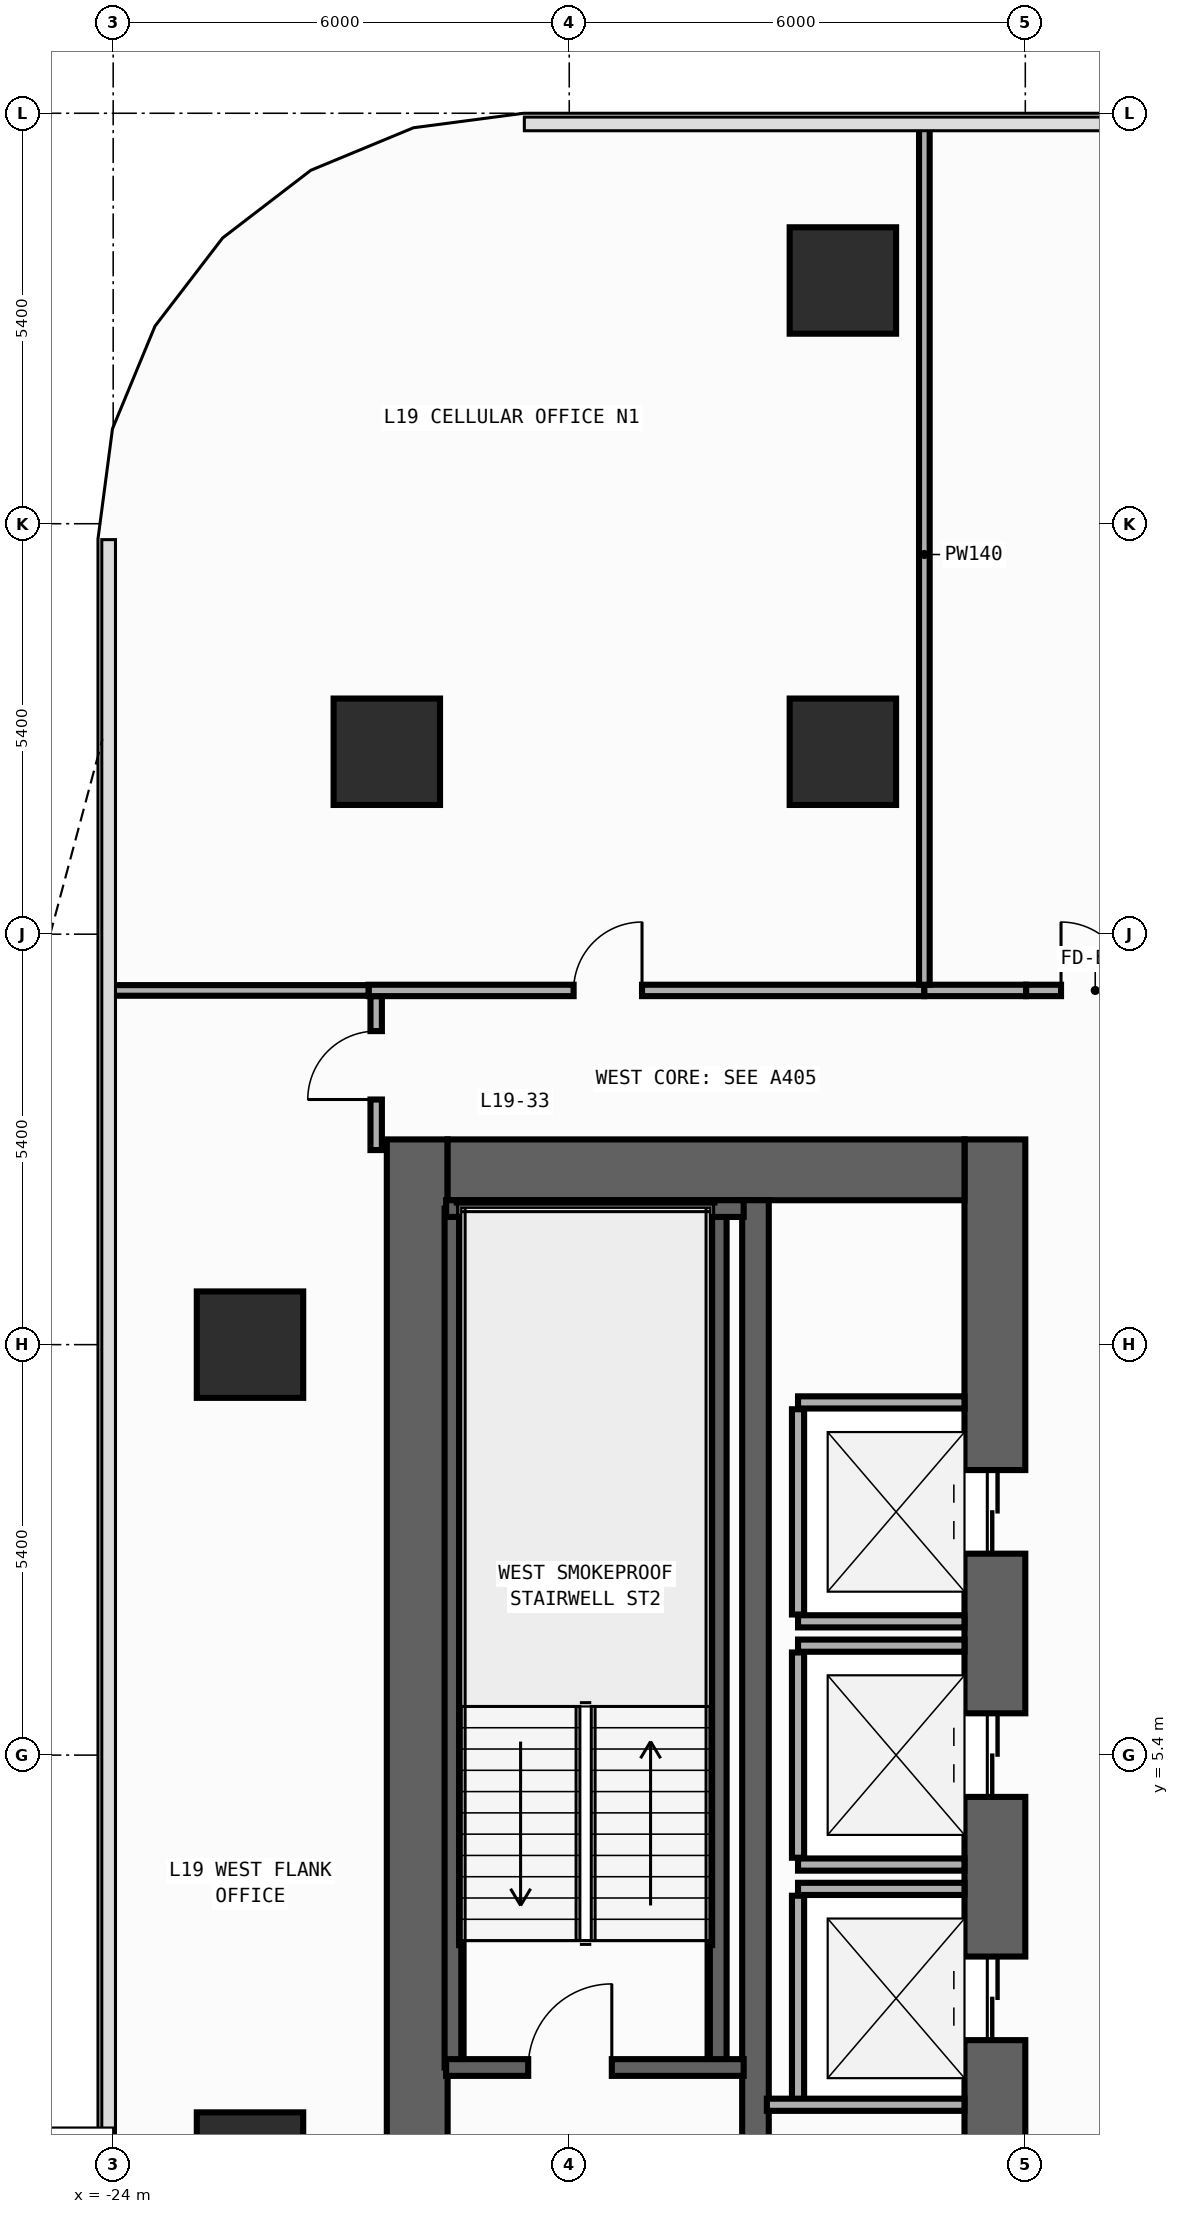
"""IFC4 building model, lengths in metres.
Left out: names, types, materials, properties, quantities, classifications, styles, units other than length and angle.
Written with IfcOpenShell. Run it as: python <this file> out.ifc"""

import sys

from ifc_helpers import new_model, si_unit, direction, frame, frame_2d, origin, origin_2d, place, context, subcontext, project, spatial, rectangle, extrude, element, fill, save


model = new_model("IFC4")
c1 = context("Model", 3, precision=1e-05, world=origin(), true_north=direction((0.0, 1.0)))
c2 = subcontext(c1, "Body", "Model", "MODEL_VIEW")
j1 = project(units=[si_unit("LENGTHUNIT", "METRE"), si_unit("PLANEANGLEUNIT", "RADIAN")], contexts=[c1])
p1 = place(None, origin())
s1 = spatial("IfcSite", under=j1, at=p1, CompositionType="ELEMENT")
p2 = place(p1, origin())
s2 = spatial("IfcBuilding", under=s1, at=p2, CompositionType="ELEMENT")
p3 = place(p2, frame((0.0, 0.0, 80.6)))
s3 = spatial("IfcBuildingStorey", under=s2, at=p3, CompositionType="ELEMENT", Elevation=80.6)
p4 = place(p3, frame((-20.0, -13.5, 0.0), z_axis=(0.0, 0.0, 1.0), x_axis=(0.0, 1.0, 0.0)))
e1 = element("IfcWall", 1, at=p4, inside=s3, PredefinedType="SHEAR", context=c2, shape_type="SweptSolid", body=[
    extrude(rectangle(XDim=27.0, YDim=0.8, at=frame_2d((13.5, 0.0))), origin(), (0.0, 0.0, 1.0), 3.85),
])
p5 = place(p3, frame((-12.4, -13.5, 0.0), z_axis=(0.0, 0.0, 1.0), x_axis=(0.0, 1.0, 0.0)))
e2 = element("IfcWall", 2, at=p5, inside=s3, PredefinedType="SHEAR", context=c2, shape_type="SweptSolid", body=[
    extrude(rectangle(XDim=27.0, YDim=0.8, at=frame_2d((13.5, 0.0))), origin(), (0.0, 0.0, 1.0), 3.85),
])
p6 = place(p5, frame((21.55, 0.0, 0.0)))
e3 = element("IfcOpeningElement", 3, at=p6, cuts=e2, PredefinedType="OPENING", context=c2, shape_type="SweptSolid", body=[
    extrude(rectangle(XDim=1.1, YDim=2.2, at=frame_2d((0.55, 1.1))), frame((0.0, 0.41, 0.0), z_axis=(0.0, -1.0, 0.0), x_axis=(1.0, 0.0, 0.0)), (0.0, 0.0, 1.0), 0.82),
])
p7 = place(p5, frame((18.35, 0.0, 0.0)))
e4 = element("IfcOpeningElement", 4, at=p7, cuts=e2, PredefinedType="OPENING", context=c2, shape_type="SweptSolid", body=[
    extrude(rectangle(XDim=1.1, YDim=2.2, at=frame_2d((0.55, 1.1))), frame((0.0, 0.41, 0.0), z_axis=(0.0, -1.0, 0.0), x_axis=(1.0, 0.0, 0.0)), (0.0, 0.0, 1.0), 0.82),
])
p8 = place(p5, frame((15.15, 0.0, 0.0)))
e5 = element("IfcOpeningElement", 5, at=p8, cuts=e2, PredefinedType="OPENING", context=c2, shape_type="SweptSolid", body=[
    extrude(rectangle(XDim=1.1, YDim=2.2, at=frame_2d((0.55, 1.1))), frame((0.0, 0.41, 0.0), z_axis=(0.0, -1.0, 0.0), x_axis=(1.0, 0.0, 0.0)), (0.0, 0.0, 1.0), 0.82),
])
p9 = place(p5, frame((10.35, 0.0, 0.0)))
e6 = element("IfcOpeningElement", 6, at=p9, cuts=e2, PredefinedType="OPENING", context=c2, shape_type="SweptSolid", body=[
    extrude(rectangle(XDim=1.1, YDim=2.2, at=frame_2d((0.55, 1.1))), frame((0.0, 0.41, 0.0), z_axis=(0.0, -1.0, 0.0), x_axis=(1.0, 0.0, 0.0)), (0.0, 0.0, 1.0), 0.82),
])
p10 = place(p5, frame((7.15, 0.0, 0.0)))
e7 = element("IfcOpeningElement", 7, at=p10, cuts=e2, PredefinedType="OPENING", context=c2, shape_type="SweptSolid", body=[
    extrude(rectangle(XDim=1.1, YDim=2.2, at=frame_2d((0.55, 1.1))), frame((0.0, 0.41, 0.0), z_axis=(0.0, -1.0, 0.0), x_axis=(1.0, 0.0, 0.0)), (0.0, 0.0, 1.0), 0.82),
])
p11 = place(p5, frame((3.95, 0.0, 0.0)))
e8 = element("IfcOpeningElement", 8, at=p11, cuts=e2, PredefinedType="OPENING", context=c2, shape_type="SweptSolid", body=[
    extrude(rectangle(XDim=1.1, YDim=2.2, at=frame_2d((0.55, 1.1))), frame((0.0, 0.41, 0.0), z_axis=(0.0, -1.0, 0.0), x_axis=(1.0, 0.0, 0.0)), (0.0, 0.0, 1.0), 0.82),
])
p12 = place(p5, frame((12.725, 0.0, 0.0)))
e9 = element("IfcOpeningElement", 9, at=p12, cuts=e2, PredefinedType="OPENING", context=c2, shape_type="SweptSolid", body=[
    extrude(rectangle(XDim=1.15, YDim=2.2, at=frame_2d((0.575, 1.1))), frame((0.0, 0.41, 0.0), z_axis=(0.0, -1.0, 0.0), x_axis=(1.0, 0.0, 0.0)), (0.0, 0.0, 1.0), 0.82),
])
p13 = place(p5, frame((1.625, 0.0, 0.0)))
e10 = element("IfcOpeningElement", 10, at=p13, cuts=e2, PredefinedType="OPENING", context=c2, shape_type="SweptSolid", body=[
    extrude(rectangle(XDim=0.85, YDim=2.1, at=frame_2d((0.425, 1.05))), frame((0.0, 0.41, 0.0), z_axis=(0.0, -1.0, 0.0), x_axis=(1.0, 0.0, 0.0)), (0.0, 0.0, 1.0), 0.82),
])
p14 = place(p3, frame((-19.6, 13.1, 0.0), z_axis=(0.0, 0.0, 1.0), x_axis=(1.0, 0.0, 0.0)))
e11 = element("IfcWall", 11, at=p14, inside=s3, PredefinedType="SHEAR", context=c2, shape_type="SweptSolid", body=[
    extrude(rectangle(XDim=6.8, YDim=0.8, at=frame_2d((3.4, 0.0))), origin(), (0.0, 0.0, 1.0), 3.85),
])
p15 = place(p3, frame((-15.55, -12.7, 0.0), z_axis=(0.0, 0.0, 1.0), x_axis=(0.0, 1.0, 0.0)))
e12 = element("IfcWall", 12, at=p15, inside=s3, PredefinedType="SHEAR", context=c2, shape_type="SweptSolid", body=[
    extrude(rectangle(XDim=25.4, YDim=0.35, at=frame_2d((12.7, 0.0))), origin(), (0.0, 0.0, 1.0), 3.85),
])
p16 = place(p15, frame((11.925, 0.0, 0.0)))
e13 = element("IfcOpeningElement", 13, at=p16, cuts=e12, PredefinedType="OPENING", context=c2, shape_type="SweptSolid", body=[
    extrude(rectangle(XDim=1.15, YDim=2.2, at=frame_2d((0.575, 1.1))), frame((0.0, 0.185, 0.0), z_axis=(0.0, -1.0, 0.0), x_axis=(1.0, 0.0, 0.0)), (0.0, 0.0, 1.0), 0.37),
])
p17 = place(p15, frame((0.825, 0.0, 0.0)))
e14 = element("IfcOpeningElement", 14, at=p17, cuts=e12, PredefinedType="OPENING", context=c2, shape_type="SweptSolid", body=[
    extrude(rectangle(XDim=0.85, YDim=2.1, at=frame_2d((0.425, 1.05))), frame((0.0, 0.185, 0.0), z_axis=(0.0, -1.0, 0.0), x_axis=(1.0, 0.0, 0.0)), (0.0, 0.0, 1.0), 0.37),
])
for number, where, z_axis, x_axis in (
    (15, (-16.04, 1.29, 0.0), (0.0, 0.0, 1.0), (0.0, 1.0, 0.0)),
    (16, (-19.53, 1.29, 0.0), (0.0, 0.0, 1.0), (0.0, 1.0, 0.0)),
):
    element("IfcWall", number, at=place(p3, frame(where, z_axis=z_axis, x_axis=x_axis)), inside=s3, PredefinedType="SHEAR", context=c2, shape_type="SweptSolid", body=[
        extrude(rectangle(XDim=11.3, YDim=0.22, at=frame_2d((5.65, 0.0))), origin(), (0.0, 0.0, 1.0), 3.85),
    ])
p18 = place(p3, frame((-19.62, 12.59, 0.0), z_axis=(0.0, 0.0, 1.0), x_axis=(1.0, 0.0, 0.0)))
e17 = element("IfcWall", 17, at=p18, inside=s3, PredefinedType="SHEAR", context=c2, shape_type="SweptSolid", body=[
    extrude(rectangle(XDim=3.915, YDim=0.22, at=frame_2d((1.958, 0.0))), origin(), (0.0, 0.0, 1.0), 3.85),
])
p19 = place(p3, frame((-19.62, 1.29, 0.0), z_axis=(0.0, 0.0, 1.0), x_axis=(1.0, 0.0, 0.0)))
e18 = element("IfcWall", 18, at=p19, inside=s3, PredefinedType="SHEAR", context=c2, shape_type="SweptSolid", body=[
    extrude(rectangle(XDim=3.915, YDim=0.22, at=frame_2d((1.958, 0.0))), origin(), (0.0, 0.0, 1.0), 3.85),
])
p20 = place(p19, frame((1.08, 0.0, 0.0)))
e19 = element("IfcOpeningElement", 19, at=p20, cuts=e18, PredefinedType="OPENING", context=c2, shape_type="SweptSolid", body=[
    extrude(rectangle(XDim=1.1, YDim=2.2, at=frame_2d((0.55, 1.1))), frame((0.0, 0.12, 0.0), z_axis=(0.0, -1.0, 0.0), x_axis=(1.0, 0.0, 0.0)), (0.0, 0.0, 1.0), 0.24),
])
for number, where, z_axis, x_axis in (
    (20, (-20.4, 18.6, 0.0), (0.0, 0.0, 1.0), (1.0, 0.0, 0.0)),
    (21, (-14.4, 18.6, 0.0), (0.0, 0.0, 1.0), (1.0, 0.0, 0.0)),
    (22, (-22.2, 0.0, 0.0), (0.0, 0.0, 1.0), (1.0, 0.0, 0.0)),
    (23, (-22.2, 10.8, 0.0), (0.0, 0.0, 1.0), (1.0, 0.0, 0.0)),
    (24, (-14.4, 24.8, 0.0), (0.0, 0.0, 1.0), (1.0, 0.0, 0.0)),
):
    element("IfcColumn", number, at=place(p3, frame(where, z_axis=z_axis, x_axis=x_axis)), inside=s3, PredefinedType="COLUMN", context=c2, shape_type="SweptSolid", body=[
        extrude(rectangle(XDim=1.4, YDim=1.4, at=origin_2d()), origin(), (0.0, 0.0, 1.0), 4.2),
    ])
for number, where, z_axis, x_axis in (
    (25, (-14.99, 7.16, 0.0), (0.0, 0.0, 1.0), (1.0, 0.0, 0.0)),
    (26, (-14.99, 10.04, 0.0), (0.0, 0.0, 1.0), (1.0, 0.0, 0.0)),
):
    element("IfcWall", number, at=place(p3, frame(where, z_axis=z_axis, x_axis=x_axis)), inside=s3, PredefinedType="STANDARD", context=c2, shape_type="SweptSolid", body=[
        extrude(rectangle(XDim=2.19, YDim=0.16, at=frame_2d((1.095, 0.0))), origin(), (0.0, 0.0, 1.0), 3.85),
    ])
p21 = place(p3, frame((-14.99, 7.25, 0.0), z_axis=(0.0, 0.0, 1.0), x_axis=(0.0, 1.0, 0.0)))
e27 = element("IfcWall", 27, at=p21, inside=s3, PredefinedType="STANDARD", context=c2, shape_type="SweptSolid", body=[
    extrude(rectangle(XDim=2.7, YDim=0.16, at=frame_2d((1.35, 0.0))), origin(), (0.0, 0.0, 1.0), 3.85),
])
for number, where, z_axis, x_axis in (
    (28, (-14.99, 3.96, 0.0), (0.0, 0.0, 1.0), (1.0, 0.0, 0.0)),
    (29, (-14.99, 6.84, 0.0), (0.0, 0.0, 1.0), (1.0, 0.0, 0.0)),
):
    element("IfcWall", number, at=place(p3, frame(where, z_axis=z_axis, x_axis=x_axis)), inside=s3, PredefinedType="STANDARD", context=c2, shape_type="SweptSolid", body=[
        extrude(rectangle(XDim=2.19, YDim=0.16, at=frame_2d((1.095, 0.0))), origin(), (0.0, 0.0, 1.0), 3.85),
    ])
p22 = place(p3, frame((-14.99, 4.05, 0.0), z_axis=(0.0, 0.0, 1.0), x_axis=(0.0, 1.0, 0.0)))
e30 = element("IfcWall", 30, at=p22, inside=s3, PredefinedType="STANDARD", context=c2, shape_type="SweptSolid", body=[
    extrude(rectangle(XDim=2.7, YDim=0.16, at=frame_2d((1.35, 0.0))), origin(), (0.0, 0.0, 1.0), 3.85),
])
p23 = place(p3, frame((-14.99, 3.64, 0.0), z_axis=(0.0, 0.0, 1.0), x_axis=(1.0, 0.0, 0.0)))
e31 = element("IfcWall", 31, at=p23, inside=s3, PredefinedType="STANDARD", context=c2, shape_type="SweptSolid", body=[
    extrude(rectangle(XDim=2.19, YDim=0.16, at=frame_2d((1.095, 0.0))), origin(), (0.0, 0.0, 1.0), 3.85),
])
p24 = place(p3, frame((-14.99, 0.85, 0.0), z_axis=(0.0, 0.0, 1.0), x_axis=(0.0, 1.0, 0.0)))
e32 = element("IfcWall", 32, at=p24, inside=s3, PredefinedType="STANDARD", context=c2, shape_type="SweptSolid", body=[
    extrude(rectangle(XDim=2.7, YDim=0.16, at=frame_2d((1.35, 0.0))), origin(), (0.0, 0.0, 1.0), 3.85),
])
p25 = place(p3, frame((-15.4, 0.8, 0.0), z_axis=(0.0, 0.0, 1.0), x_axis=(1.0, 0.0, 0.0)))
e33 = element("IfcWall", 33, at=p25, inside=s3, PredefinedType="STANDARD", context=c2, shape_type="SweptSolid", body=[
    extrude(rectangle(XDim=2.6, YDim=0.16, at=frame_2d((1.3, 0.0))), origin(), (0.0, 0.0, 1.0), 3.85),
])
p26 = place(p3, frame((-11.99, 15.46, 0.0), z_axis=(0.0, 0.0, 1.0), x_axis=(1.0, 0.0, 0.0)))
e34 = element("IfcWall", 34, at=p26, inside=s3, PredefinedType="PARTITIONING", context=c2, shape_type="SweptSolid", body=[
    extrude(rectangle(XDim=1.98, YDim=0.15, at=frame_2d((0.99, 0.0))), origin(), (0.0, 0.0, 1.0), 3.85),
])
p27 = place(p26, frame((0.46, 0.0, 0.0)))
e35 = element("IfcOpeningElement", 35, at=p27, cuts=e34, PredefinedType="OPENING", context=c2, shape_type="SweptSolid", body=[
    extrude(rectangle(XDim=0.9, YDim=2.15, at=frame_2d((0.45, 1.075))), frame((0.0, 0.085, 0.0), z_axis=(0.0, -1.0, 0.0), x_axis=(1.0, 0.0, 0.0)), (0.0, 0.0, 1.0), 0.17),
])
p28 = place(p3, frame((-20.54, 13.36, 0.0), z_axis=(0.0, 0.0, 1.0), x_axis=(0.0, 1.0, 0.0)))
e36 = element("IfcWall", 36, at=p28, inside=s3, PredefinedType="PARTITIONING", context=c2, shape_type="SweptSolid", body=[
    extrude(rectangle(XDim=2.025, YDim=0.15, at=frame_2d((1.012, 0.0))), origin(), (0.0, 0.0, 1.0), 3.85),
])
p29 = place(p28, frame((0.665, 0.0, 0.0)))
e37 = element("IfcOpeningElement", 37, at=p29, cuts=e36, PredefinedType="OPENING", context=c2, shape_type="SweptSolid", body=[
    extrude(rectangle(XDim=0.9, YDim=2.15, at=frame_2d((0.45, 1.075))), frame((0.0, 0.085, 0.0), z_axis=(0.0, -1.0, 0.0), x_axis=(1.0, 0.0, 0.0)), (0.0, 0.0, 1.0), 0.17),
])
p30 = place(p3, frame((-20.64, 15.46, 0.0), z_axis=(0.0, 0.0, 1.0), x_axis=(1.0, 0.0, 0.0)))
e38 = element("IfcWall", 38, at=p30, inside=s3, PredefinedType="PARTITIONING", context=c2, shape_type="SweptSolid", body=[
    extrude(rectangle(XDim=7.312, YDim=0.15, at=frame_2d((3.656, 0.0))), origin(), (0.0, 0.0, 1.0), 3.85),
])
p31 = place(p30, frame((2.698, 0.0, 0.0)))
e39 = element("IfcOpeningElement", 39, at=p31, cuts=e38, PredefinedType="OPENING", context=c2, shape_type="SweptSolid", body=[
    extrude(rectangle(XDim=0.9, YDim=2.15, at=frame_2d((0.45, 1.075))), frame((0.0, 0.085, 0.0), z_axis=(0.0, -1.0, 0.0), x_axis=(1.0, 0.0, 0.0)), (0.0, 0.0, 1.0), 0.17),
])
p32 = place(p3, frame((-13.328, 15.46, 0.0), z_axis=(0.0, 0.0, 1.0), x_axis=(1.0, 0.0, 0.0)))
e40 = element("IfcWall", 40, at=p32, inside=s3, PredefinedType="PARTITIONING", context=c2, shape_type="SweptSolid", body=[
    extrude(rectangle(XDim=1.338, YDim=0.15, at=frame_2d((0.669, 0.0))), origin(), (0.0, 0.0, 1.0), 3.85),
])
p33 = place(p3, frame((-24.055, 15.46, 0.0), z_axis=(0.0, 0.0, 1.0), x_axis=(1.0, 0.0, 0.0)))
e41 = element("IfcWall", 41, at=p33, inside=s3, PredefinedType="PARTITIONING", context=c2, shape_type="SweptSolid", body=[
    extrude(rectangle(XDim=3.415, YDim=0.14, at=frame_2d((1.708, 0.0))), origin(), (0.0, 0.0, 1.0), 3.85),
])
p34 = place(p3, frame((-13.328, 15.535, 0.0), z_axis=(0.0, 0.0, 1.0), x_axis=(0.0, 1.0, 0.0)))
e42 = element("IfcWall", 42, at=p34, inside=s3, PredefinedType="PARTITIONING", context=c2, shape_type="SweptSolid", body=[
    extrude(rectangle(XDim=11.32, YDim=0.14, at=frame_2d((5.66, 0.0))), origin(), (0.0, 0.0, 1.0), 3.85),
])
p35 = place(p20, origin())
e43 = element("IfcDoor", 43, at=p35, inside=s3, OperationType="SINGLE_SWING_RIGHT", PredefinedType="DOOR", context=c2, shape_type="SweptSolid", body=[
    extrude(rectangle(XDim=1.1, YDim=2.2, at=frame_2d((0.55, 1.1))), frame((0.0, 0.025, 0.0), z_axis=(0.0, -1.0, 0.0), x_axis=(1.0, 0.0, 0.0)), (0.0, 0.0, 1.0), 0.05),
])
fill(e19, e43)
p36 = place(p6, origin())
e44 = element("IfcDoor", 44, at=p36, inside=s3, OperationType="DOUBLE_DOOR_SLIDING", PredefinedType="DOOR", context=c2, shape_type="SweptSolid", body=[
    extrude(rectangle(XDim=1.1, YDim=2.2, at=frame_2d((0.55, 1.1))), frame((0.0, 0.025, 0.0), z_axis=(0.0, -1.0, 0.0), x_axis=(1.0, 0.0, 0.0)), (0.0, 0.0, 1.0), 0.05),
])
fill(e3, e44)
p37 = place(p7, origin())
e45 = element("IfcDoor", 45, at=p37, inside=s3, OperationType="DOUBLE_DOOR_SLIDING", PredefinedType="DOOR", context=c2, shape_type="SweptSolid", body=[
    extrude(rectangle(XDim=1.1, YDim=2.2, at=frame_2d((0.55, 1.1))), frame((0.0, 0.025, 0.0), z_axis=(0.0, -1.0, 0.0), x_axis=(1.0, 0.0, 0.0)), (0.0, 0.0, 1.0), 0.05),
])
fill(e4, e45)
p38 = place(p8, origin())
e46 = element("IfcDoor", 46, at=p38, inside=s3, OperationType="DOUBLE_DOOR_SLIDING", PredefinedType="DOOR", context=c2, shape_type="SweptSolid", body=[
    extrude(rectangle(XDim=1.1, YDim=2.2, at=frame_2d((0.55, 1.1))), frame((0.0, 0.025, 0.0), z_axis=(0.0, -1.0, 0.0), x_axis=(1.0, 0.0, 0.0)), (0.0, 0.0, 1.0), 0.05),
])
fill(e5, e46)
p39 = place(p27, origin())
e47 = element("IfcDoor", 47, at=p39, inside=s3, OperationType="SINGLE_SWING_LEFT", PredefinedType="DOOR", context=c2, shape_type="SweptSolid", body=[
    extrude(rectangle(XDim=0.9, YDim=2.15, at=frame_2d((0.45, 1.075))), frame((0.0, 0.025, 0.0), z_axis=(0.0, -1.0, 0.0), x_axis=(1.0, 0.0, 0.0)), (0.0, 0.0, 1.0), 0.05),
])
fill(e35, e47)
p40 = place(p29, origin())
e48 = element("IfcDoor", 48, at=p40, inside=s3, OperationType="SINGLE_SWING_LEFT", PredefinedType="DOOR", context=c2, shape_type="SweptSolid", body=[
    extrude(rectangle(XDim=0.9, YDim=2.15, at=frame_2d((0.45, 1.075))), frame((0.0, 0.025, 0.0), z_axis=(0.0, -1.0, 0.0), x_axis=(1.0, 0.0, 0.0)), (0.0, 0.0, 1.0), 0.05),
])
fill(e37, e48)
p41 = place(p31, origin())
e49 = element("IfcDoor", 49, at=p41, inside=s3, OperationType="SINGLE_SWING_RIGHT", PredefinedType="DOOR", context=c2, shape_type="SweptSolid", body=[
    extrude(rectangle(XDim=0.9, YDim=2.15, at=frame_2d((0.45, 1.075))), frame((0.0, 0.025, 0.0), z_axis=(0.0, -1.0, 0.0), x_axis=(1.0, 0.0, 0.0)), (0.0, 0.0, 1.0), 0.05),
])
fill(e39, e49)
save(model, sys.argv[1])
